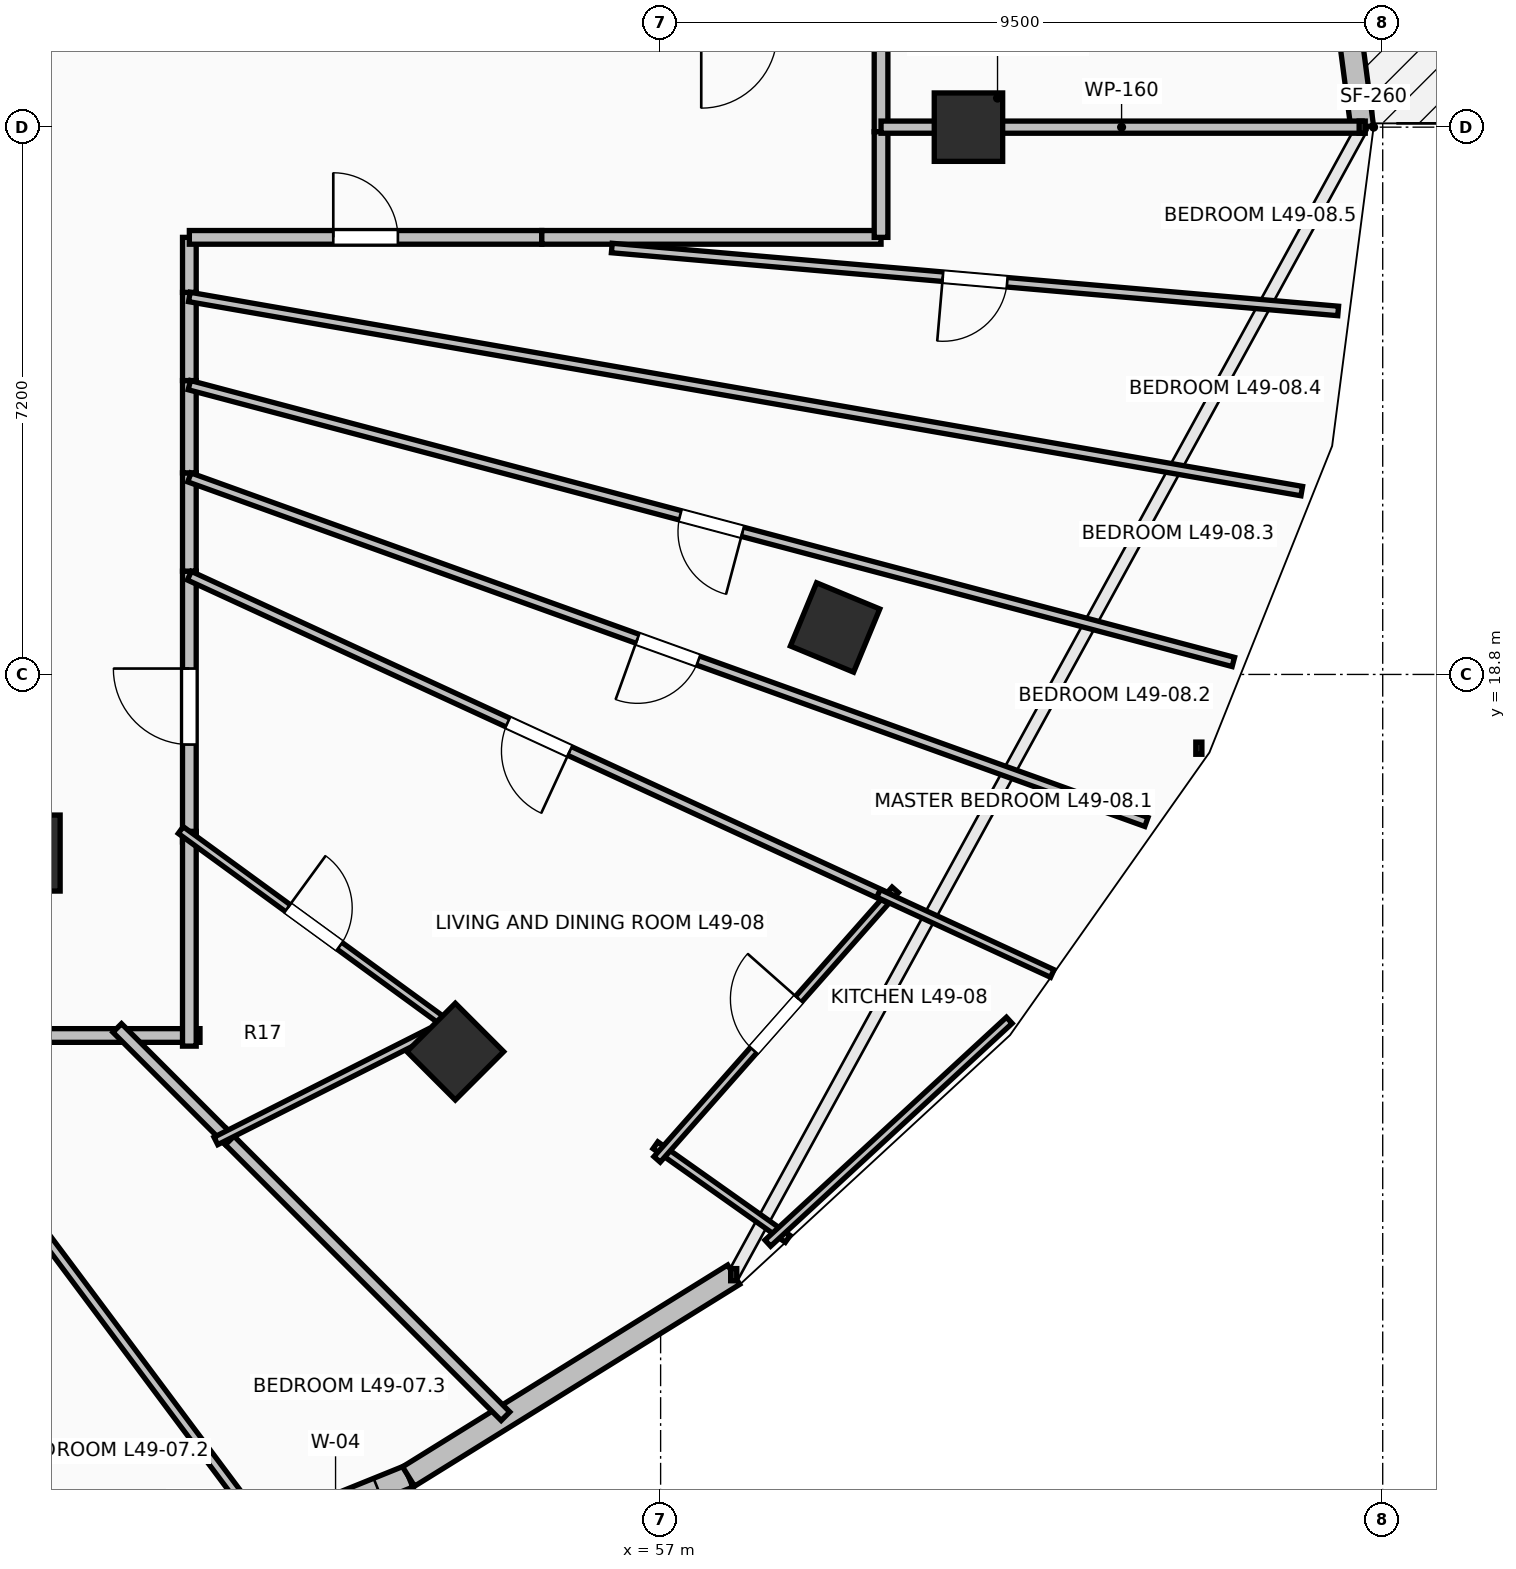
"""IFC4 building model, lengths in metres.
Left out: names, types, materials, properties, quantities, classifications, styles, units other than length and angle.
Written with IfcOpenShell. Run it as: python <this file> out.ifc"""

import sys

from ifc_helpers import new_model, si_unit, direction, frame, frame_2d, origin, origin_2d, place, context, subcontext, project, spatial, rectangle, extrude, element, fill, save


model = new_model("IFC4")
c1 = context("Model", 3, precision=1e-05, world=origin(), true_north=direction((0.0, 1.0)))
c2 = subcontext(c1, "Body", "Model", "MODEL_VIEW")
j1 = project(units=[si_unit("LENGTHUNIT", "METRE"), si_unit("PLANEANGLEUNIT", "RADIAN")], contexts=[c1])
p1 = place(None, origin())
s1 = spatial("IfcSite", under=j1, at=p1, CompositionType="ELEMENT")
p2 = place(p1, origin())
s2 = spatial("IfcBuilding", under=s1, at=p2, CompositionType="ELEMENT")
p3 = place(p2, frame((0.0, 0.0, 182.6)))
s3 = spatial("IfcBuildingStorey", under=s2, at=p3, CompositionType="ELEMENT", Elevation=182.6)
for number, where, z_axis, x_axis in (
    (1, (61.05, 26.0, 0.0), (0.0, 0.0, 1.0), (1.0, 0.0, 0.0)),
    (2, (54.299, 13.838, 0.0), (0.0, 0.0, 1.0), (0.707, -0.707, 0.0)),
    (3, (59.295, 19.418, 0.0), (0.0, 0.0, 1.0), (0.924, -0.383, 0.0)),
):
    element("IfcColumn", number, at=place(p3, frame(where, z_axis=z_axis, x_axis=x_axis)), inside=s3, PredefinedType="COLUMN", context=c2, shape_type="SweptSolid", body=[
        extrude(rectangle(XDim=0.9, YDim=0.9, at=origin_2d()), origin(), (0.0, 0.0, 1.0), 3.5),
    ])
p4 = place(p3, frame((48.75, 16.45, 0.0), z_axis=(0.0, 0.0, 1.0), x_axis=(1.0, 0.0, 0.0)))
e4 = element("IfcColumn", 4, at=p4, inside=s3, PredefinedType="PILASTER", context=c2, shape_type="SweptSolid", body=[
    extrude(rectangle(XDim=0.7, YDim=1.0, at=origin_2d()), origin(), (0.0, 0.0, 1.0), 3.5),
])
p5 = place(p3, frame((66.23, 26.0, 0.0), z_axis=(0.0, 0.0, 1.0), x_axis=(-0.129147853268, 0.991625348605, 0.0)))
e5 = element("IfcWall", 5, at=p5, inside=s3, PredefinedType="STANDARD", context=c2, shape_type="SweptSolid", body=[
    extrude(rectangle(XDim=4.2, YDim=0.3, at=frame_2d((2.1, 0.0))), origin(), (0.0, 0.0, 1.0), 3.24),
])
p6 = place(p5, frame((1.3, 0.0, 0.0)))
e6 = element("IfcOpeningElement", 6, at=p6, cuts=e5, PredefinedType="OPENING", context=c2, shape_type="SweptSolid", body=[
    extrude(rectangle(XDim=1.6, YDim=2.3, at=frame_2d((0.8, 1.15))), frame((0.0, 0.165, 0.0), z_axis=(0.0, -1.0, 0.0), x_axis=(1.0, 0.0, 0.0)), (0.0, 0.0, 1.0), 0.33),
])
p7 = place(p3, frame((48.803, 6.275, 0.0), z_axis=(0.0, 0.0, 1.0), x_axis=(0.927111094334, 0.374786630981, 0.0)))
e7 = element("IfcWall", 7, at=p7, inside=s3, PredefinedType="STANDARD", context=c2, shape_type="SweptSolid", body=[
    extrude(rectangle(XDim=5.264, YDim=0.3, at=frame_2d((2.632, 0.0))), origin(), (0.0, 0.0, 1.0), 3.24),
])
p8 = place(p7, frame((1.618, 0.0, 0.85)))
e8 = element("IfcOpeningElement", 8, at=p8, cuts=e7, PredefinedType="OPENING", context=c2, shape_type="SweptSolid", body=[
    extrude(rectangle(XDim=1.2, YDim=1.95, at=frame_2d((0.6, 0.975))), frame((0.0, 0.165, 0.0), z_axis=(0.0, -1.0, 0.0), x_axis=(1.0, 0.0, 0.0)), (0.0, 0.0, 1.0), 0.33),
])
p9 = place(p7, frame((3.628, 0.0, 0.85)))
e9 = element("IfcOpeningElement", 9, at=p9, cuts=e7, PredefinedType="OPENING", context=c2, shape_type="SweptSolid", body=[
    extrude(rectangle(XDim=1.2, YDim=1.95, at=frame_2d((0.6, 0.975))), frame((0.0, 0.165, 0.0), z_axis=(0.0, -1.0, 0.0), x_axis=(1.0, 0.0, 0.0)), (0.0, 0.0, 1.0), 0.33),
])
p10 = place(p3, frame((53.684, 8.248, 0.0), z_axis=(0.0, 0.0, 1.0), x_axis=(0.849647657754, 0.527350791858, 0.0)))
e10 = element("IfcWall", 10, at=p10, inside=s3, PredefinedType="STANDARD", context=c2, shape_type="SweptSolid", body=[
    extrude(rectangle(XDim=5.035, YDim=0.3, at=frame_2d((2.518, 0.0))), origin(), (0.0, 0.0, 1.0), 3.24),
])
p11 = place(p3, frame((59.9, 25.94, 0.0), z_axis=(0.0, 0.0, 1.0), x_axis=(0.0, 1.0, 0.0)))
e11 = element("IfcWall", 11, at=p11, inside=s3, PredefinedType="PARTITIONING", context=c2, shape_type="SweptSolid", body=[
    extrude(rectangle(XDim=1.31, YDim=0.18, at=frame_2d((0.655, 0.0))), origin(), (0.0, 0.0, 1.0), 2.432),
])
p12 = place(p3, frame((46.998, 14.05, 0.0), z_axis=(0.0, 0.0, 1.0), x_axis=(1.0, 0.0, 0.0)))
e12 = element("IfcWall", 12, at=p12, inside=s3, PredefinedType="PARTITIONING", context=c2, shape_type="SweptSolid", body=[
    extrude(rectangle(XDim=3.037, YDim=0.18, at=frame_2d((1.519, 0.0))), origin(), (0.0, 0.0, 1.0), 2.432),
])
p13 = place(p12, frame((1.094, 0.0, 0.0)))
e13 = element("IfcOpeningElement", 13, at=p13, cuts=e12, PredefinedType="OPENING", context=c2, shape_type="SweptSolid", body=[
    extrude(rectangle(XDim=0.85, YDim=2.1, at=frame_2d((0.425, 1.05))), frame((0.0, 0.105, 0.0), z_axis=(0.0, -1.0, 0.0), x_axis=(1.0, 0.0, 0.0)), (0.0, 0.0, 1.0), 0.21),
])
p14 = place(p3, frame((50.8, 16.596, 0.0), z_axis=(0.0, 0.0, 1.0), x_axis=(0.0, 1.0, 0.0)))
e14 = element("IfcWall", 14, at=p14, inside=s3, PredefinedType="PARTITIONING", context=c2, shape_type="SweptSolid", body=[
    extrude(rectangle(XDim=3.563, YDim=0.18, at=frame_2d((1.781, 0.0))), origin(), (0.0, 0.0, 1.0), 2.922),
])
p15 = place(p14, frame((1.281, 0.0, 0.0)))
e15 = element("IfcOpeningElement", 15, at=p15, cuts=e14, PredefinedType="OPENING", context=c2, shape_type="SweptSolid", body=[
    extrude(rectangle(XDim=1.0, YDim=2.15, at=frame_2d((0.5, 1.075))), frame((0.0, 0.105, 0.0), z_axis=(0.0, -1.0, 0.0), x_axis=(1.0, 0.0, 0.0)), (0.0, 0.0, 1.0), 0.21),
])
p16 = place(p3, frame((49.895, 14.05, 0.0), z_axis=(0.0, 0.0, 1.0), x_axis=(1.0, 0.0, 0.0)))
e16 = element("IfcWall", 16, at=p16, inside=s3, PredefinedType="PARTITIONING", context=c2, shape_type="SweptSolid", body=[
    extrude(rectangle(XDim=1.045, YDim=0.18, at=frame_2d((0.522, 0.0))), origin(), (0.0, 0.0, 1.0), 2.874),
])
p17 = place(p3, frame((50.8, 13.91, 0.0), z_axis=(0.0, 0.0, 1.0), x_axis=(0.0, 1.0, 0.0)))
e17 = element("IfcWall", 17, at=p17, inside=s3, PredefinedType="PARTITIONING", context=c2, shape_type="SweptSolid", body=[
    extrude(rectangle(XDim=2.826, YDim=0.18, at=frame_2d((1.413, 0.0))), origin(), (0.0, 0.0, 1.0), 2.432),
])
p18 = place(p3, frame((50.8, 20.159, 0.0), z_axis=(0.0, 0.0, 1.0), x_axis=(0.0, 1.0, 0.0)))
e18 = element("IfcWall", 18, at=p18, inside=s3, PredefinedType="PARTITIONING", context=c2, shape_type="SweptSolid", body=[
    extrude(rectangle(XDim=1.293, YDim=0.18, at=frame_2d((0.646, 0.0))), origin(), (0.0, 0.0, 1.0), 3.24),
])
p19 = place(p3, frame((50.8, 21.452, 0.0), z_axis=(0.0, 0.0, 1.0), x_axis=(0.0, 1.0, 0.0)))
e19 = element("IfcWall", 19, at=p19, inside=s3, PredefinedType="PARTITIONING", context=c2, shape_type="SweptSolid", body=[
    extrude(rectangle(XDim=1.214, YDim=0.18, at=frame_2d((0.607, 0.0))), origin(), (0.0, 0.0, 1.0), 3.24),
])
p20 = place(p3, frame((50.8, 22.666, 0.0), z_axis=(0.0, 0.0, 1.0), x_axis=(0.0, 1.0, 0.0)))
e20 = element("IfcWall", 20, at=p20, inside=s3, PredefinedType="PARTITIONING", context=c2, shape_type="SweptSolid", body=[
    extrude(rectangle(XDim=1.16, YDim=0.18, at=frame_2d((0.58, 0.0))), origin(), (0.0, 0.0, 1.0), 3.24),
])
p21 = place(p3, frame((50.8, 23.826, 0.0), z_axis=(0.0, 0.0, 1.0), x_axis=(0.0, 1.0, 0.0)))
e21 = element("IfcWall", 21, at=p21, inside=s3, PredefinedType="PARTITIONING", context=c2, shape_type="SweptSolid", body=[
    extrude(rectangle(XDim=0.724, YDim=0.18, at=frame_2d((0.362, 0.0))), origin(), (0.0, 0.0, 1.0), 3.24),
])
p22 = place(p3, frame((50.8, 24.55, 0.0), z_axis=(0.0, 0.0, 1.0), x_axis=(1.0, 0.0, 0.0)))
e22 = element("IfcWall", 22, at=p22, inside=s3, PredefinedType="PARTITIONING", context=c2, shape_type="SweptSolid", body=[
    extrude(rectangle(XDim=4.637, YDim=0.18, at=frame_2d((2.318, 0.0))), origin(), (0.0, 0.0, 1.0), 2.432),
])
p23 = place(p22, frame((1.894, 0.0, 0.0)))
e23 = element("IfcOpeningElement", 23, at=p23, cuts=e22, PredefinedType="OPENING", context=c2, shape_type="SweptSolid", body=[
    extrude(rectangle(XDim=0.85, YDim=2.1, at=frame_2d((0.425, 1.05))), frame((0.0, 0.105, 0.0), z_axis=(0.0, -1.0, 0.0), x_axis=(1.0, 0.0, 0.0)), (0.0, 0.0, 1.0), 0.21),
])
p24 = place(p3, frame((55.437, 24.55, 0.0), z_axis=(0.0, 0.0, 1.0), x_axis=(1.0, 0.0, 0.0)))
e24 = element("IfcWall", 24, at=p24, inside=s3, PredefinedType="PARTITIONING", context=c2, shape_type="SweptSolid", body=[
    extrude(rectangle(XDim=4.463, YDim=0.18, at=frame_2d((2.231, 0.0))), origin(), (0.0, 0.0, 1.0), 2.874),
])
p25 = place(p3, frame((59.9, 24.55, 0.0), z_axis=(0.0, 0.0, 1.0), x_axis=(0.0, 1.0, 0.0)))
e25 = element("IfcWall", 25, at=p25, inside=s3, PredefinedType="PARTITIONING", context=c2, shape_type="SweptSolid", body=[
    extrude(rectangle(XDim=1.39, YDim=0.18, at=frame_2d((0.695, 0.0))), origin(), (0.0, 0.0, 1.0), 2.432),
])
p26 = place(p3, frame((59.9, 26.0, 0.0), z_axis=(0.0, 0.0, 1.0), x_axis=(1.0, 0.0, 0.0)))
e26 = element("IfcWall", 26, at=p26, inside=s3, PredefinedType="PARTITIONING", context=c2, shape_type="SweptSolid", body=[
    extrude(rectangle(XDim=6.329, YDim=0.16, at=frame_2d((3.165, 0.0))), origin(), (0.0, 0.0, 1.0), 2.432),
])
p27 = place(p3, frame((51.818, 7.496, 0.0), z_axis=(0.0, 0.0, 1.0), x_axis=(-0.598399090147, 0.801198183292, 0.0)))
e27 = element("IfcWall", 27, at=p27, inside=s3, PredefinedType="PARTITIONING", context=c2, shape_type="SweptSolid", body=[
    extrude(rectangle(XDim=8.18, YDim=0.125, at=frame_2d((4.09, 0.0))), origin(), (0.0, 0.0, 1.0), 2.432),
])
p28 = place(p3, frame((54.959, 9.041, 0.0), z_axis=(0.0, 0.0, 1.0), x_axis=(-0.707106781187, 0.707106781187, 0.0)))
e28 = element("IfcWall", 28, at=p28, inside=s3, PredefinedType="PARTITIONING", context=c2, shape_type="SweptSolid", body=[
    extrude(rectangle(XDim=5.271, YDim=0.16, at=frame_2d((2.635, 0.0))), origin(), (0.0, 0.0, 1.0), 2.774),
])
p29 = place(p3, frame((51.331, 12.669, 0.0), z_axis=(0.0, 0.0, 1.0), x_axis=(-0.707106781187, 0.707106781187, 0.0)))
e29 = element("IfcWall", 29, at=p29, inside=s3, PredefinedType="PARTITIONING", context=c2, shape_type="SweptSolid", body=[
    extrude(rectangle(XDim=2.093, YDim=0.16, at=frame_2d((1.046, 0.0))), origin(), (0.0, 0.0, 1.0), 2.874),
])
p30 = place(p3, frame((50.687, 16.752, 0.0), z_axis=(0.0, 0.0, 1.0), x_axis=(0.808074646764, -0.589080100883, 0.0)))
e30 = element("IfcWall", 30, at=p30, inside=s3, PredefinedType="PARTITIONING", context=c2, shape_type="SweptSolid", body=[
    extrude(rectangle(XDim=4.329, YDim=0.11, at=frame_2d((2.165, 0.0))), origin(), (0.0, 0.0, 1.0), 2.874),
])
p31 = place(p30, frame((1.74, 0.0, 0.0)))
e31 = element("IfcOpeningElement", 31, at=p31, cuts=e30, PredefinedType="OPENING", context=c2, shape_type="SweptSolid", body=[
    extrude(rectangle(XDim=0.85, YDim=2.1, at=frame_2d((0.425, 1.05))), frame((0.0, 0.07, 0.0), z_axis=(0.0, -1.0, 0.0), x_axis=(1.0, 0.0, 0.0)), (0.0, 0.0, 1.0), 0.14),
])
p32 = place(p3, frame((53.964, 14.085, 0.0), z_axis=(0.0, 0.0, 1.0), x_axis=(-0.892546166909, -0.450956028828, 0.0)))
e32 = element("IfcWall", 32, at=p32, inside=s3, PredefinedType="PARTITIONING", context=c2, shape_type="SweptSolid", body=[
    extrude(rectangle(XDim=3.154, YDim=0.11, at=frame_2d((1.577, 0.0))), origin(), (0.0, 0.0, 1.0), 2.432),
])
p33 = place(p3, frame((58.672, 11.374, 0.0), z_axis=(0.0, 0.0, 1.0), x_axis=(-0.816262906602, 0.577680592807, 0.0)))
e33 = element("IfcWall", 33, at=p33, inside=s3, PredefinedType="PARTITIONING", context=c2, shape_type="SweptSolid", body=[
    extrude(rectangle(XDim=2.133, YDim=0.11, at=frame_2d((1.066, 0.0))), origin(), (0.0, 0.0, 1.0), 3.24),
])
p34 = place(p3, frame((56.953, 12.42, 0.0), z_axis=(0.0, 0.0, 1.0), x_axis=(0.662189711464, 0.749336230294, 0.0)))
e34 = element("IfcWall", 34, at=p34, inside=s3, PredefinedType="PARTITIONING", context=c2, shape_type="SweptSolid", body=[
    extrude(rectangle(XDim=4.732, YDim=0.11, at=frame_2d((2.366, 0.0))), origin(), (0.0, 0.0, 1.0), 3.24),
])
p35 = place(p34, frame((1.916, 0.0, 0.0)))
e35 = element("IfcOpeningElement", 35, at=p35, cuts=e34, PredefinedType="OPENING", context=c2, shape_type="SweptSolid", body=[
    extrude(rectangle(XDim=0.9, YDim=2.1, at=frame_2d((0.45, 1.05))), frame((0.0, 0.07, 0.0), z_axis=(0.0, -1.0, 0.0), x_axis=(1.0, 0.0, 0.0)), (0.0, 0.0, 1.0), 0.14),
])
p36 = place(p3, frame((58.41, 11.318, 0.0), z_axis=(0.0, 0.0, 1.0), x_axis=(0.734861902375, 0.678216768031, 0.0)))
e36 = element("IfcWall", 36, at=p36, inside=s3, PredefinedType="PARTITIONING", context=c2, shape_type="SweptSolid", body=[
    extrude(rectangle(XDim=4.323, YDim=0.11, at=frame_2d((2.162, 0.0))), origin(), (0.0, 0.0, 1.0), 3.24),
])
p37 = place(p3, frame((59.994, 15.861, 0.0), z_axis=(0.0, 0.0, 1.0), x_axis=(-0.908157621609, 0.41862839645, 0.0)))
e37 = element("IfcWall", 37, at=p37, inside=s3, PredefinedType="PARTITIONING", context=c2, shape_type="SweptSolid", body=[
    extrude(rectangle(XDim=10.124, YDim=0.125, at=frame_2d((5.062, 0.0))), origin(), (0.0, 0.0, 1.0), 2.774),
])
p38 = place(p37, frame((4.612, 0.0, 0.0)))
e38 = element("IfcOpeningElement", 38, at=p38, cuts=e37, PredefinedType="OPENING", context=c2, shape_type="SweptSolid", body=[
    extrude(rectangle(XDim=0.9, YDim=2.1, at=frame_2d((0.45, 1.05))), frame((0.0, 0.077, 0.0), z_axis=(0.0, -1.0, 0.0), x_axis=(1.0, 0.0, 0.0)), (0.0, 0.0, 1.0), 0.155),
])
p39 = place(p3, frame((62.153, 14.865, 0.0), z_axis=(0.0, 0.0, 1.0), x_axis=(-0.908101251341, 0.418750662462, 0.0)))
e39 = element("IfcWall", 39, at=p39, inside=s3, PredefinedType="PARTITIONING", context=c2, shape_type="SweptSolid", body=[
    extrude(rectangle(XDim=2.518, YDim=0.11, at=frame_2d((1.259, 0.0))), origin(), (0.0, 0.0, 1.0), 3.24),
])
p40 = place(p3, frame((63.391, 16.859, 0.0), z_axis=(0.0, 0.0, 1.0), x_axis=(-0.940877411069, 0.338747246985, 0.0)))
e40 = element("IfcWall", 40, at=p40, inside=s3, PredefinedType="PARTITIONING", context=c2, shape_type="SweptSolid", body=[
    extrude(rectangle(XDim=13.382, YDim=0.125, at=frame_2d((6.691, 0.0))), origin(), (0.0, 0.0, 1.0), 2.774),
])
p41 = place(p40, frame((6.266, 0.0, 0.0)))
e41 = element("IfcOpeningElement", 41, at=p41, cuts=e40, PredefinedType="OPENING", context=c2, shape_type="SweptSolid", body=[
    extrude(rectangle(XDim=0.85, YDim=2.1, at=frame_2d((0.425, 1.05))), frame((0.0, 0.077, 0.0), z_axis=(0.0, -1.0, 0.0), x_axis=(1.0, 0.0, 0.0)), (0.0, 0.0, 1.0), 0.155),
])
p42 = place(p3, frame((64.535, 18.964, 0.0), z_axis=(0.0, 0.0, 1.0), x_axis=(-0.966598137313, 0.256296782934, 0.0)))
e42 = element("IfcWall", 42, at=p42, inside=s3, PredefinedType="PARTITIONING", context=c2, shape_type="SweptSolid", body=[
    extrude(rectangle(XDim=14.209, YDim=0.125, at=frame_2d((7.105, 0.0))), origin(), (0.0, 0.0, 1.0), 2.432),
])
p43 = place(p42, frame((6.68, 0.0, 0.0)))
e43 = element("IfcOpeningElement", 43, at=p43, cuts=e42, PredefinedType="OPENING", context=c2, shape_type="SweptSolid", body=[
    extrude(rectangle(XDim=0.85, YDim=2.1, at=frame_2d((0.425, 1.05))), frame((0.0, 0.077, 0.0), z_axis=(0.0, -1.0, 0.0), x_axis=(1.0, 0.0, 0.0)), (0.0, 0.0, 1.0), 0.155),
])
p44 = place(p3, frame((65.435, 21.212, 0.0), z_axis=(0.0, 0.0, 1.0), x_axis=(-0.985109541297, 0.171927867563, 0.0)))
e44 = element("IfcWall", 44, at=p44, inside=s3, PredefinedType="PARTITIONING", context=c2, shape_type="SweptSolid", body=[
    extrude(rectangle(XDim=14.856, YDim=0.125, at=frame_2d((7.428, 0.0))), origin(), (0.0, 0.0, 1.0), 2.432),
])
p45 = place(p3, frame((65.914, 23.582, 0.0), z_axis=(0.0, 0.0, 1.0), x_axis=(-0.99626832952, 0.086309997072, 0.0)))
e45 = element("IfcWall", 45, at=p45, inside=s3, PredefinedType="PARTITIONING", context=c2, shape_type="SweptSolid", body=[
    extrude(rectangle(XDim=9.592, YDim=0.125, at=frame_2d((4.796, 0.0))), origin(), (0.0, 0.0, 1.0), 2.774),
])
p46 = place(p45, frame((4.371, 0.0, 0.0)))
e46 = element("IfcOpeningElement", 46, at=p46, cuts=e45, PredefinedType="OPENING", context=c2, shape_type="SweptSolid", body=[
    extrude(rectangle(XDim=0.85, YDim=2.1, at=frame_2d((0.425, 1.05))), frame((0.0, 0.077, 0.0), z_axis=(0.0, -1.0, 0.0), x_axis=(1.0, 0.0, 0.0)), (0.0, 0.0, 1.0), 0.155),
])
p47 = place(p9, origin())
e47 = element("IfcWindow", 47, at=p47, inside=s3, PartitioningType="SINGLE_PANEL", PredefinedType="WINDOW", context=c2, shape_type="SweptSolid", body=[
    extrude(rectangle(XDim=1.2, YDim=1.95, at=frame_2d((0.6, 0.975))), frame((0.0, 0.03, 0.0), z_axis=(0.0, -1.0, 0.0), x_axis=(1.0, 0.0, 0.0)), (0.0, 0.0, 1.0), 0.06),
])
fill(e9, e47)
p48 = place(p15, origin())
e48 = element("IfcDoor", 48, at=p48, inside=s3, OperationType="SINGLE_SWING_RIGHT", PredefinedType="DOOR", context=c2, shape_type="SweptSolid", body=[
    extrude(rectangle(XDim=1.0, YDim=2.15, at=frame_2d((0.5, 1.075))), frame((0.0, 0.025, 0.0), z_axis=(0.0, -1.0, 0.0), x_axis=(1.0, 0.0, 0.0)), (0.0, 0.0, 1.0), 0.05),
])
fill(e15, e48)
p49 = place(p31, origin())
e49 = element("IfcDoor", 49, at=p49, inside=s3, OperationType="SINGLE_SWING_LEFT", PredefinedType="DOOR", context=c2, shape_type="SweptSolid", body=[
    extrude(rectangle(XDim=0.85, YDim=2.1, at=frame_2d((0.425, 1.05))), frame((0.0, 0.025, 0.0), z_axis=(0.0, -1.0, 0.0), x_axis=(1.0, 0.0, 0.0)), (0.0, 0.0, 1.0), 0.05),
])
fill(e31, e49)
p50 = place(p35, origin())
e50 = element("IfcDoor", 50, at=p50, inside=s3, OperationType="SINGLE_SWING_RIGHT", PredefinedType="DOOR", context=c2, shape_type="SweptSolid", body=[
    extrude(rectangle(XDim=0.9, YDim=2.1, at=frame_2d((0.45, 1.05))), frame((0.0, 0.025, 0.0), z_axis=(0.0, -1.0, 0.0), x_axis=(1.0, 0.0, 0.0)), (0.0, 0.0, 1.0), 0.05),
])
fill(e35, e50)
p51 = place(p38, origin())
e51 = element("IfcDoor", 51, at=p51, inside=s3, OperationType="SINGLE_SWING_LEFT", PredefinedType="DOOR", context=c2, shape_type="SweptSolid", body=[
    extrude(rectangle(XDim=0.9, YDim=2.1, at=frame_2d((0.45, 1.05))), frame((0.0, 0.025, 0.0), z_axis=(0.0, -1.0, 0.0), x_axis=(1.0, 0.0, 0.0)), (0.0, 0.0, 1.0), 0.05),
])
fill(e38, e51)
p52 = place(p23, origin())
e52 = element("IfcDoor", 52, at=p52, inside=s3, OperationType="SINGLE_SWING_LEFT", PredefinedType="DOOR", context=c2, shape_type="SweptSolid", body=[
    extrude(rectangle(XDim=0.85, YDim=2.1, at=frame_2d((0.425, 1.05))), frame((0.0, 0.025, 0.0), z_axis=(0.0, -1.0, 0.0), x_axis=(1.0, 0.0, 0.0)), (0.0, 0.0, 1.0), 0.05),
])
fill(e23, e52)
p53 = place(p41, origin())
e53 = element("IfcDoor", 53, at=p53, inside=s3, OperationType="SINGLE_SWING_RIGHT", PredefinedType="DOOR", context=c2, shape_type="SweptSolid", body=[
    extrude(rectangle(XDim=0.85, YDim=2.1, at=frame_2d((0.425, 1.05))), frame((0.0, 0.025, 0.0), z_axis=(0.0, -1.0, 0.0), x_axis=(1.0, 0.0, 0.0)), (0.0, 0.0, 1.0), 0.05),
])
fill(e41, e53)
p54 = place(p43, origin())
e54 = element("IfcDoor", 54, at=p54, inside=s3, OperationType="SINGLE_SWING_LEFT", PredefinedType="DOOR", context=c2, shape_type="SweptSolid", body=[
    extrude(rectangle(XDim=0.85, YDim=2.1, at=frame_2d((0.425, 1.05))), frame((0.0, 0.025, 0.0), z_axis=(0.0, -1.0, 0.0), x_axis=(1.0, 0.0, 0.0)), (0.0, 0.0, 1.0), 0.05),
])
fill(e43, e54)
p55 = place(p46, origin())
e55 = element("IfcDoor", 55, at=p55, inside=s3, OperationType="SINGLE_SWING_RIGHT", PredefinedType="DOOR", context=c2, shape_type="SweptSolid", body=[
    extrude(rectangle(XDim=0.85, YDim=2.1, at=frame_2d((0.425, 1.05))), frame((0.0, 0.025, 0.0), z_axis=(0.0, -1.0, 0.0), x_axis=(1.0, 0.0, 0.0)), (0.0, 0.0, 1.0), 0.05),
])
fill(e46, e55)
save(model, sys.argv[1])
